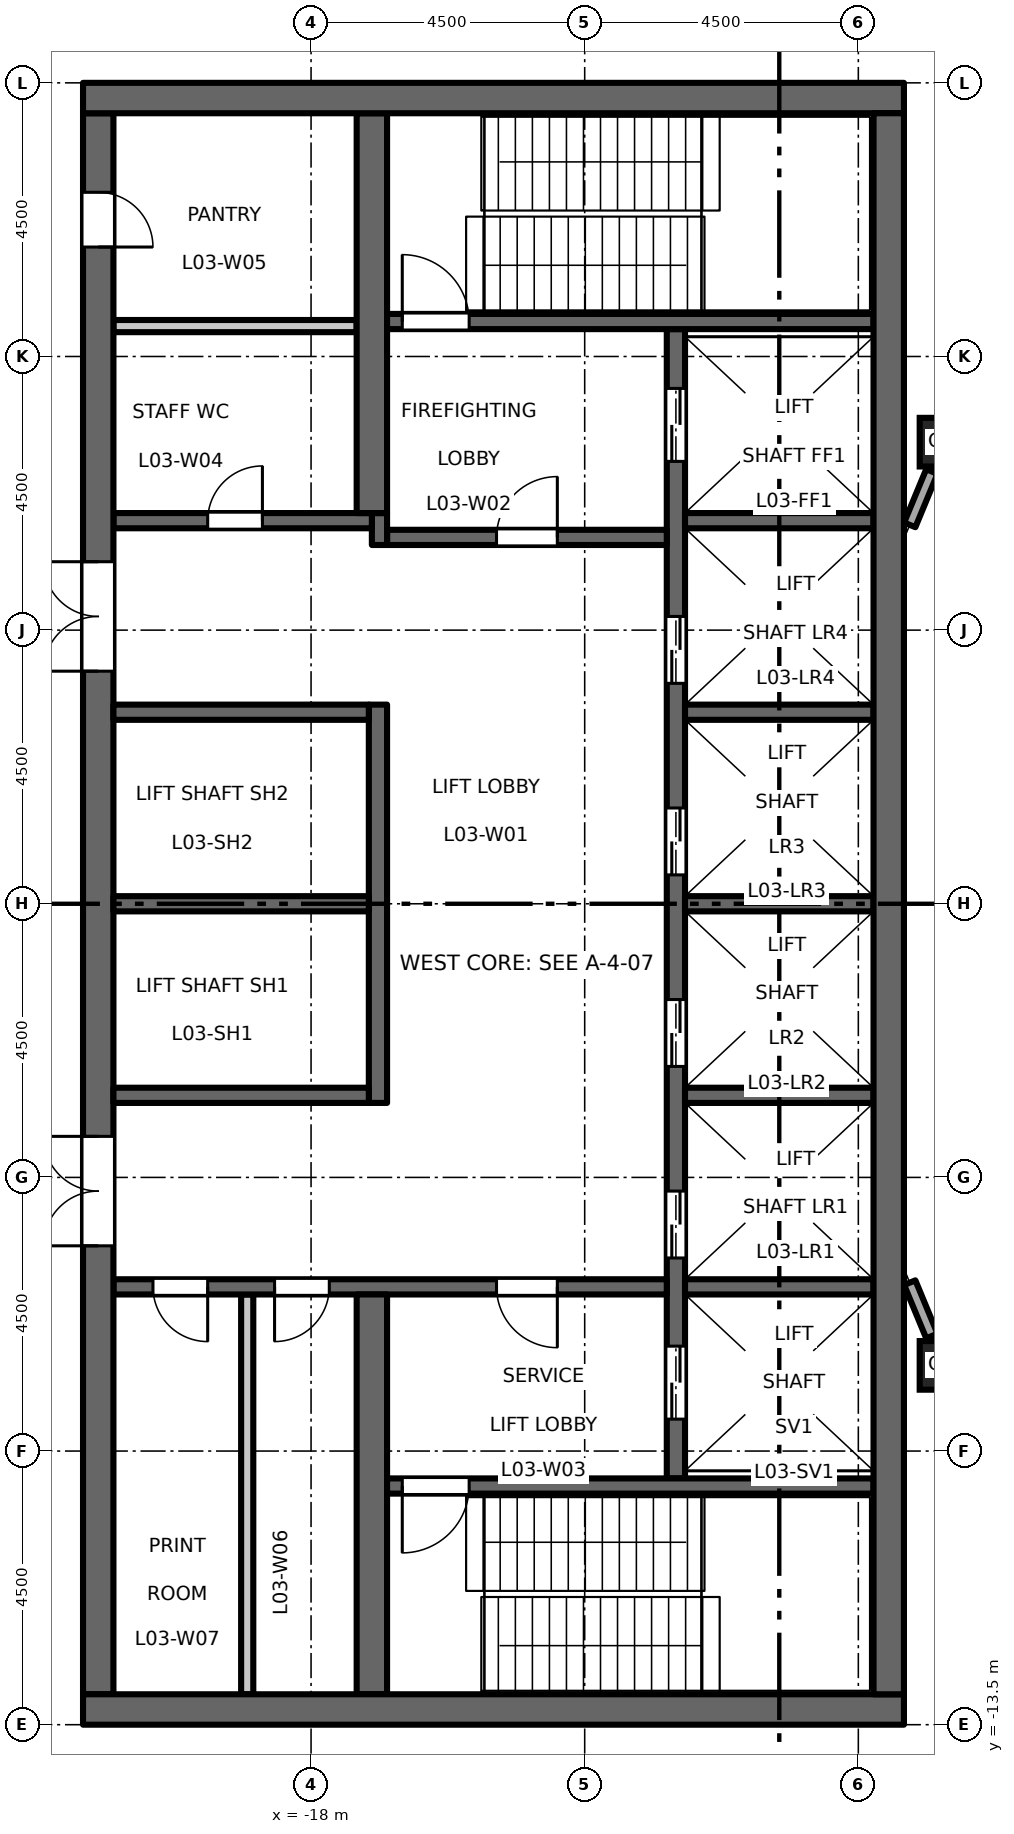
"""IFC4 building model, lengths in metres.
Left out: names, types, materials, properties, quantities, classifications, styles, units other than length and angle.
Written with IfcOpenShell. Run it as: python <this file> out.ifc"""

import sys

from ifc_helpers import new_model, si_unit, direction, frame, frame_2d, origin, origin_2d, place, context, subcontext, project, spatial, rectangle, hollow_rectangle, extrude, element, fill, save


model = new_model("IFC4")
c1 = context("Model", 3, precision=1e-05, world=origin(), true_north=direction((0.0, 1.0)))
c2 = subcontext(c1, "Body", "Model", "MODEL_VIEW")
j1 = project(units=[si_unit("LENGTHUNIT", "METRE"), si_unit("PLANEANGLEUNIT", "RADIAN")], contexts=[c1])
p1 = place(None, origin())
s1 = spatial("IfcSite", under=j1, at=p1, CompositionType="ELEMENT")
p2 = place(p1, origin())
s2 = spatial("IfcBuilding", under=s1, at=p2, CompositionType="ELEMENT")
p3 = place(p2, frame((0.0, 0.0, 17.2)))
s3 = spatial("IfcBuildingStorey", under=s2, at=p3, CompositionType="ELEMENT", Elevation=17.2)
for number, where, z_axis, x_axis in (
    (1, (-7.591, -7.591, 0.0), (0.0, 0.0, 1.0), (1.0, 0.0, 0.0)),
    (2, (-7.591, 7.591, 0.0), (0.0, 0.0, 1.0), (1.0, 0.0, 0.0)),
):
    element("IfcColumn", number, at=place(p3, frame(where, z_axis=z_axis, x_axis=x_axis)), inside=s3, PredefinedType="COLUMN", context=c2, shape_type="SweptSolid", body=[
        extrude(hollow_rectangle(XDim=0.8, YDim=0.8, WallThickness=0.05, at=origin_2d()), origin(), (0.0, 0.0, 1.0), 5.0),
    ])
p4 = place(p3, frame((-12.0, -9.45, 0.0), z_axis=(0.0, 0.0, 1.0), x_axis=(0.0, 1.0, 0.0)))
e3 = element("IfcWall", 3, at=p4, inside=s3, PredefinedType="SHEAR", context=c2, shape_type="SweptSolid", body=[
    extrude(rectangle(XDim=18.9, YDim=0.3, at=frame_2d((9.45, 0.0))), origin(), (0.0, 0.0, 1.0), 4.85),
])
p5 = place(p4, frame((3.625, 0.0, 0.0)))
e4 = element("IfcOpeningElement", 4, at=p5, cuts=e3, PredefinedType="OPENING", context=c2, shape_type="SweptSolid", body=[
    extrude(rectangle(XDim=1.1, YDim=2.1, at=frame_2d((0.55, 1.05))), frame((0.0, 0.16, 0.0), z_axis=(0.0, -1.0, 0.0), x_axis=(1.0, 0.0, 0.0)), (0.0, 0.0, 1.0), 0.32),
])
p6 = place(p4, frame((6.775, 0.0, 0.0)))
e5 = element("IfcOpeningElement", 5, at=p6, cuts=e3, PredefinedType="OPENING", context=c2, shape_type="SweptSolid", body=[
    extrude(rectangle(XDim=1.1, YDim=2.1, at=frame_2d((0.55, 1.05))), frame((0.0, 0.16, 0.0), z_axis=(0.0, -1.0, 0.0), x_axis=(1.0, 0.0, 0.0)), (0.0, 0.0, 1.0), 0.32),
])
p7 = place(p4, frame((9.925, 0.0, 0.0)))
e6 = element("IfcOpeningElement", 6, at=p7, cuts=e3, PredefinedType="OPENING", context=c2, shape_type="SweptSolid", body=[
    extrude(rectangle(XDim=1.1, YDim=2.1, at=frame_2d((0.55, 1.05))), frame((0.0, 0.16, 0.0), z_axis=(0.0, -1.0, 0.0), x_axis=(1.0, 0.0, 0.0)), (0.0, 0.0, 1.0), 0.32),
])
p8 = place(p4, frame((13.075, 0.0, 0.0)))
e7 = element("IfcOpeningElement", 7, at=p8, cuts=e3, PredefinedType="OPENING", context=c2, shape_type="SweptSolid", body=[
    extrude(rectangle(XDim=1.1, YDim=2.1, at=frame_2d((0.55, 1.05))), frame((0.0, 0.16, 0.0), z_axis=(0.0, -1.0, 0.0), x_axis=(1.0, 0.0, 0.0)), (0.0, 0.0, 1.0), 0.32),
])
p9 = place(p4, frame((16.725, 0.0, 0.0)))
e8 = element("IfcOpeningElement", 8, at=p9, cuts=e3, PredefinedType="OPENING", context=c2, shape_type="SweptSolid", body=[
    extrude(rectangle(XDim=1.2, YDim=2.1, at=frame_2d((0.6, 1.05))), frame((0.0, 0.16, 0.0), z_axis=(0.0, -1.0, 0.0), x_axis=(1.0, 0.0, 0.0)), (0.0, 0.0, 1.0), 0.32),
])
p10 = place(p4, frame((0.975, 0.0, 0.0)))
e9 = element("IfcOpeningElement", 9, at=p10, cuts=e3, PredefinedType="OPENING", context=c2, shape_type="SweptSolid", body=[
    extrude(rectangle(XDim=1.2, YDim=2.1, at=frame_2d((0.6, 1.05))), frame((0.0, 0.16, 0.0), z_axis=(0.0, -1.0, 0.0), x_axis=(1.0, 0.0, 0.0)), (0.0, 0.0, 1.0), 0.32),
])
p11 = place(p3, frame((-12.15, 6.025, 0.0), z_axis=(0.0, 0.0, 1.0), x_axis=(-1.0, 0.0, 0.0)))
e10 = element("IfcWall", 10, at=p11, inside=s3, PredefinedType="SHEAR", context=c2, shape_type="SweptSolid", body=[
    extrude(rectangle(XDim=4.6, YDim=0.25, at=frame_2d((2.3, 0.0))), origin(), (0.0, 0.0, 1.0), 4.85),
])
p12 = place(p11, frame((1.8, 0.0, 0.0)))
e11 = element("IfcOpeningElement", 11, at=p12, cuts=e10, PredefinedType="OPENING", context=c2, shape_type="SweptSolid", body=[
    extrude(rectangle(XDim=1.0, YDim=2.1, at=frame_2d((0.5, 1.05))), frame((0.0, 0.135, 0.0), z_axis=(0.0, -1.0, 0.0), x_axis=(1.0, 0.0, 0.0)), (0.0, 0.0, 1.0), 0.27),
])
p13 = place(p3, frame((-16.875, 5.9, 0.0), z_axis=(0.0, 0.0, 1.0), x_axis=(0.0, 1.0, 0.0)))
e12 = element("IfcWall", 12, at=p13, inside=s3, PredefinedType="SHEAR", context=c2, shape_type="SweptSolid", body=[
    extrude(rectangle(XDim=0.525, YDim=0.25, at=frame_2d((0.263, 0.0))), origin(), (0.0, 0.0, 1.0), 4.85),
])
p14 = place(p3, frame((-17.0, 6.3, 0.0), z_axis=(0.0, 0.0, 1.0), x_axis=(-1.0, 0.0, 0.0)))
e13 = element("IfcWall", 13, at=p14, inside=s3, PredefinedType="SHEAR", context=c2, shape_type="SweptSolid", body=[
    extrude(rectangle(XDim=4.25, YDim=0.25, at=frame_2d((2.125, 0.0))), origin(), (0.0, 0.0, 1.0), 4.85),
])
p15 = place(p14, frame((1.8, 0.0, 0.0)))
e14 = element("IfcOpeningElement", 14, at=p15, cuts=e13, PredefinedType="OPENING", context=c2, shape_type="SweptSolid", body=[
    extrude(rectangle(XDim=0.9, YDim=2.1, at=frame_2d((0.45, 1.05))), frame((0.0, 0.135, 0.0), z_axis=(0.0, -1.0, 0.0), x_axis=(1.0, 0.0, 0.0)), (0.0, 0.0, 1.0), 0.27),
])
p16 = place(p3, frame((-12.15, -6.3, 0.0), z_axis=(0.0, 0.0, 1.0), x_axis=(-1.0, 0.0, 0.0)))
e15 = element("IfcWall", 15, at=p16, inside=s3, PredefinedType="SHEAR", context=c2, shape_type="SweptSolid", body=[
    extrude(rectangle(XDim=9.1, YDim=0.25, at=frame_2d((4.55, 0.0))), origin(), (0.0, 0.0, 1.0), 4.85),
])
p17 = place(p16, frame((1.8, 0.0, 0.0)))
e16 = element("IfcOpeningElement", 16, at=p17, cuts=e15, PredefinedType="OPENING", context=c2, shape_type="SweptSolid", body=[
    extrude(rectangle(XDim=1.0, YDim=2.1, at=frame_2d((0.5, 1.05))), frame((0.0, 0.135, 0.0), z_axis=(0.0, -1.0, 0.0), x_axis=(1.0, 0.0, 0.0)), (0.0, 0.0, 1.0), 0.27),
])
p18 = place(p16, frame((5.55, 0.0, 0.0)))
e17 = element("IfcOpeningElement", 17, at=p18, cuts=e15, PredefinedType="OPENING", context=c2, shape_type="SweptSolid", body=[
    extrude(rectangle(XDim=0.9, YDim=2.1, at=frame_2d((0.45, 1.05))), frame((0.0, 0.135, 0.0), z_axis=(0.0, -1.0, 0.0), x_axis=(1.0, 0.0, 0.0)), (0.0, 0.0, 1.0), 0.27),
])
p19 = place(p16, frame((7.55, 0.0, 0.0)))
e18 = element("IfcOpeningElement", 18, at=p19, cuts=e15, PredefinedType="OPENING", context=c2, shape_type="SweptSolid", body=[
    extrude(rectangle(XDim=0.9, YDim=2.1, at=frame_2d((0.45, 1.05))), frame((0.0, 0.135, 0.0), z_axis=(0.0, -1.0, 0.0), x_axis=(1.0, 0.0, 0.0)), (0.0, 0.0, 1.0), 0.27),
])
p20 = place(p3, frame((-21.5, -13.0, 0.0), z_axis=(0.0, 0.0, 1.0), x_axis=(0.0, 1.0, 0.0)))
e19 = element("IfcWall", 19, at=p20, inside=s3, PredefinedType="SHEAR", context=c2, shape_type="SweptSolid", body=[
    extrude(rectangle(XDim=26.0, YDim=0.5, at=frame_2d((13.0, 0.0))), origin(), (0.0, 0.0, 1.0), 4.85),
])
p21 = place(p20, frame((16.825, 0.0, 0.0)))
e20 = element("IfcOpeningElement", 20, at=p21, cuts=e19, PredefinedType="OPENING", context=c2, shape_type="SweptSolid", body=[
    extrude(rectangle(XDim=1.8, YDim=2.1, at=frame_2d((0.9, 1.05))), frame((0.0, 0.26, 0.0), z_axis=(0.0, -1.0, 0.0), x_axis=(1.0, 0.0, 0.0)), (0.0, 0.0, 1.0), 0.52),
])
p22 = place(p20, frame((7.375, 0.0, 0.0)))
e21 = element("IfcOpeningElement", 21, at=p22, cuts=e19, PredefinedType="OPENING", context=c2, shape_type="SweptSolid", body=[
    extrude(rectangle(XDim=1.8, YDim=2.1, at=frame_2d((0.9, 1.05))), frame((0.0, 0.26, 0.0), z_axis=(0.0, -1.0, 0.0), x_axis=(1.0, 0.0, 0.0)), (0.0, 0.0, 1.0), 0.52),
])
p23 = place(p20, frame((23.8, 0.0, 0.0)))
e22 = element("IfcOpeningElement", 22, at=p23, cuts=e19, PredefinedType="OPENING", context=c2, shape_type="SweptSolid", body=[
    extrude(rectangle(XDim=0.9, YDim=2.1, at=frame_2d((0.45, 1.05))), frame((0.0, 0.26, 0.0), z_axis=(0.0, -1.0, 0.0), x_axis=(1.0, 0.0, 0.0)), (0.0, 0.0, 1.0), 0.52),
])
p24 = place(p3, frame((-17.25, 9.5, 0.0), z_axis=(0.0, 0.0, 1.0), x_axis=(-1.0, 0.0, 0.0)))
e23 = element("IfcWall", 23, at=p24, inside=s3, PredefinedType="PARTITIONING", context=c2, shape_type="SweptSolid", body=[
    extrude(rectangle(XDim=4.0, YDim=0.2, at=frame_2d((2.0, 0.0))), origin(), (0.0, 0.0, 1.0), 4.85),
])
p25 = place(p3, frame((-19.05, -13.0, 0.0), z_axis=(0.0, 0.0, 1.0), x_axis=(0.0, 1.0, 0.0)))
e24 = element("IfcWall", 24, at=p25, inside=s3, PredefinedType="PARTITIONING", context=c2, shape_type="SweptSolid", body=[
    extrude(rectangle(XDim=6.575, YDim=0.2, at=frame_2d((3.288, 0.0))), origin(), (0.0, 0.0, 1.0), 4.85),
])
p26 = place(p3, frame((-16.9, -3.275, 0.0), z_axis=(0.0, 0.0, 1.0), x_axis=(0.0, 1.0, 0.0)))
e25 = element("IfcWall", 25, at=p26, inside=s3, PredefinedType="SHEAR", context=c2, shape_type="SweptSolid", body=[
    extrude(rectangle(XDim=6.55, YDim=0.3, at=frame_2d((3.275, 0.0))), origin(), (0.0, 0.0, 1.0), 4.85),
])
for number, where, z_axis, x_axis in (
    (26, (-17.05, 0.0, 0.0), (0.0, 0.0, 1.0), (-1.0, 0.0, 0.0)),
    (27, (-17.05, 3.15, 0.0), (0.0, 0.0, 1.0), (-1.0, 0.0, 0.0)),
    (28, (-17.05, -3.15, 0.0), (0.0, 0.0, 1.0), (-1.0, 0.0, 0.0)),
):
    element("IfcWall", number, at=place(p3, frame(where, z_axis=z_axis, x_axis=x_axis)), inside=s3, PredefinedType="SHEAR", context=c2, shape_type="SweptSolid", body=[
        extrude(rectangle(XDim=4.2, YDim=0.25, at=frame_2d((2.1, 0.0))), origin(), (0.0, 0.0, 1.0), 4.85),
    ])
for number, where, z_axis, x_axis in (
    (29, (-17.0, 6.425, 0.0), (0.0, 0.0, 1.0), (0.0, 1.0, 0.0)),
    (30, (-17.0, -13.0, 0.0), (0.0, 0.0, 1.0), (0.0, 1.0, 0.0)),
):
    element("IfcWall", number, at=place(p3, frame(where, z_axis=z_axis, x_axis=x_axis)), inside=s3, PredefinedType="SHEAR", context=c2, shape_type="SweptSolid", body=[
        extrude(rectangle(XDim=6.575, YDim=0.5, at=frame_2d((3.288, 0.0))), origin(), (0.0, 0.0, 1.0), 4.85),
    ])
for number, where, z_axis, x_axis in (
    (31, (-8.75, 0.0, 0.0), (0.0, 0.0, 1.0), (-1.0, 0.0, 0.0)),
    (32, (-8.75, 3.15, 0.0), (0.0, 0.0, 1.0), (-1.0, 0.0, 0.0)),
    (33, (-8.75, 6.3, 0.0), (0.0, 0.0, 1.0), (-1.0, 0.0, 0.0)),
    (34, (-8.75, -3.15, 0.0), (0.0, 0.0, 1.0), (-1.0, 0.0, 0.0)),
    (35, (-8.75, -6.3, 0.0), (0.0, 0.0, 1.0), (-1.0, 0.0, 0.0)),
):
    element("IfcWall", number, at=place(p3, frame(where, z_axis=z_axis, x_axis=x_axis)), inside=s3, PredefinedType="SHEAR", context=c2, shape_type="SweptSolid", body=[
        extrude(rectangle(XDim=3.1, YDim=0.25, at=frame_2d((1.55, 0.0))), origin(), (0.0, 0.0, 1.0), 4.85),
    ])
p27 = place(p3, frame((-8.75, 9.575, 0.0), z_axis=(0.0, 0.0, 1.0), x_axis=(-1.0, 0.0, 0.0)))
e36 = element("IfcWall", 36, at=p27, inside=s3, PredefinedType="SHEAR", context=c2, shape_type="SweptSolid", body=[
    extrude(rectangle(XDim=8.0, YDim=0.25, at=frame_2d((4.0, 0.0))), origin(), (0.0, 0.0, 1.0), 4.85),
])
p28 = place(p27, frame((6.65, 0.0, 0.0)))
e37 = element("IfcOpeningElement", 37, at=p28, cuts=e36, PredefinedType="OPENING", context=c2, shape_type="SweptSolid", body=[
    extrude(rectangle(XDim=1.1, YDim=2.1, at=frame_2d((0.55, 1.05))), frame((0.0, 0.135, 0.0), z_axis=(0.0, -1.0, 0.0), x_axis=(1.0, 0.0, 0.0)), (0.0, 0.0, 1.0), 0.27),
])
p29 = place(p3, frame((-8.75, -9.575, 0.0), z_axis=(0.0, 0.0, 1.0), x_axis=(-1.0, 0.0, 0.0)))
e38 = element("IfcWall", 38, at=p29, inside=s3, PredefinedType="SHEAR", context=c2, shape_type="SweptSolid", body=[
    extrude(rectangle(XDim=8.0, YDim=0.25, at=frame_2d((4.0, 0.0))), origin(), (0.0, 0.0, 1.0), 4.85),
])
p30 = place(p29, frame((6.65, 0.0, 0.0)))
e39 = element("IfcOpeningElement", 39, at=p30, cuts=e38, PredefinedType="OPENING", context=c2, shape_type="SweptSolid", body=[
    extrude(rectangle(XDim=1.1, YDim=2.1, at=frame_2d((0.55, 1.05))), frame((0.0, 0.135, 0.0), z_axis=(0.0, -1.0, 0.0), x_axis=(1.0, 0.0, 0.0)), (0.0, 0.0, 1.0), 0.27),
])
for number, where, z_axis, x_axis in (
    (40, (-8.25, 13.25, 0.0), (0.0, 0.0, 1.0), (-1.0, 0.0, 0.0)),
    (41, (-8.25, -13.25, 0.0), (0.0, 0.0, 1.0), (-1.0, 0.0, 0.0)),
):
    element("IfcWall", number, at=place(p3, frame(where, z_axis=z_axis, x_axis=x_axis)), inside=s3, PredefinedType="SHEAR", context=c2, shape_type="SweptSolid", body=[
        extrude(rectangle(XDim=13.5, YDim=0.5, at=frame_2d((6.75, 0.0))), origin(), (0.0, 0.0, 1.0), 4.85),
    ])
p31 = place(p3, frame((-8.5, -13.0, 0.0), z_axis=(0.0, 0.0, 1.0), x_axis=(0.0, 1.0, 0.0)))
e42 = element("IfcWall", 42, at=p31, inside=s3, PredefinedType="SHEAR", context=c2, shape_type="SweptSolid", body=[
    extrude(rectangle(XDim=26.0, YDim=0.5, at=frame_2d((13.0, 0.0))), origin(), (0.0, 0.0, 1.0), 4.85),
])
for number, where, z_axis, x_axis in (
    (43, (-7.791, 7.108, 0.0), (0.0, 0.0, 1.0), (-0.383, -0.924, 0.0)),
    (44, (-8.154, -6.231, 0.0), (0.0, 0.0, 1.0), (0.383, -0.924, 0.0)),
):
    element("IfcWall", number, at=place(p3, frame(where, z_axis=z_axis, x_axis=x_axis)), inside=s3, PredefinedType="STANDARD", context=c2, shape_type="SweptSolid", body=[
        extrude(rectangle(XDim=0.949, YDim=0.2, at=frame_2d((0.475, 0.0))), origin(), (0.0, 0.0, 1.0), 4.23),
    ])
p32 = place(p12, origin())
e45 = element("IfcDoor", 45, at=p32, inside=s3, OperationType="SINGLE_SWING_LEFT", PredefinedType="DOOR", context=c2, shape_type="SweptSolid", body=[
    extrude(rectangle(XDim=1.0, YDim=2.1, at=frame_2d((0.5, 1.05))), frame((0.0, 0.025, 0.0), z_axis=(0.0, -1.0, 0.0), x_axis=(1.0, 0.0, 0.0)), (0.0, 0.0, 1.0), 0.05),
])
fill(e11, e45)
p33 = place(p17, origin())
e46 = element("IfcDoor", 46, at=p33, inside=s3, OperationType="SINGLE_SWING_RIGHT", PredefinedType="DOOR", context=c2, shape_type="SweptSolid", body=[
    extrude(rectangle(XDim=1.0, YDim=2.1, at=frame_2d((0.5, 1.05))), frame((0.0, 0.025, 0.0), z_axis=(0.0, -1.0, 0.0), x_axis=(1.0, 0.0, 0.0)), (0.0, 0.0, 1.0), 0.05),
])
fill(e16, e46)
p34 = place(p28, origin())
e47 = element("IfcDoor", 47, at=p34, inside=s3, OperationType="SINGLE_SWING_RIGHT", PredefinedType="DOOR", context=c2, shape_type="SweptSolid", body=[
    extrude(rectangle(XDim=1.1, YDim=2.1, at=frame_2d((0.55, 1.05))), frame((0.0, 0.025, 0.0), z_axis=(0.0, -1.0, 0.0), x_axis=(1.0, 0.0, 0.0)), (0.0, 0.0, 1.0), 0.05),
])
fill(e37, e47)
p35 = place(p30, origin())
e48 = element("IfcDoor", 48, at=p35, inside=s3, OperationType="SINGLE_SWING_LEFT", PredefinedType="DOOR", context=c2, shape_type="SweptSolid", body=[
    extrude(rectangle(XDim=1.1, YDim=2.1, at=frame_2d((0.55, 1.05))), frame((0.0, 0.025, 0.0), z_axis=(0.0, -1.0, 0.0), x_axis=(1.0, 0.0, 0.0)), (0.0, 0.0, 1.0), 0.05),
])
fill(e39, e48)
p36 = place(p21, origin())
e49 = element("IfcDoor", 49, at=p36, inside=s3, OperationType="DOUBLE_DOOR_DOUBLE_SWING", PredefinedType="DOOR", context=c2, shape_type="SweptSolid", body=[
    extrude(rectangle(XDim=1.8, YDim=2.1, at=frame_2d((0.9, 1.05))), frame((0.0, 0.025, 0.0), z_axis=(0.0, -1.0, 0.0), x_axis=(1.0, 0.0, 0.0)), (0.0, 0.0, 1.0), 0.05),
])
fill(e20, e49)
p37 = place(p22, origin())
e50 = element("IfcDoor", 50, at=p37, inside=s3, OperationType="DOUBLE_DOOR_DOUBLE_SWING", PredefinedType="DOOR", context=c2, shape_type="SweptSolid", body=[
    extrude(rectangle(XDim=1.8, YDim=2.1, at=frame_2d((0.9, 1.05))), frame((0.0, 0.025, 0.0), z_axis=(0.0, -1.0, 0.0), x_axis=(1.0, 0.0, 0.0)), (0.0, 0.0, 1.0), 0.05),
])
fill(e21, e50)
p38 = place(p5, origin())
e51 = element("IfcDoor", 51, at=p38, inside=s3, OperationType="DOUBLE_DOOR_SLIDING", PredefinedType="DOOR", context=c2, shape_type="SweptSolid", body=[
    extrude(rectangle(XDim=1.1, YDim=2.1, at=frame_2d((0.55, 1.05))), frame((0.0, 0.025, 0.0), z_axis=(0.0, -1.0, 0.0), x_axis=(1.0, 0.0, 0.0)), (0.0, 0.0, 1.0), 0.05),
])
fill(e4, e51)
p39 = place(p6, origin())
e52 = element("IfcDoor", 52, at=p39, inside=s3, OperationType="DOUBLE_DOOR_SLIDING", PredefinedType="DOOR", context=c2, shape_type="SweptSolid", body=[
    extrude(rectangle(XDim=1.1, YDim=2.1, at=frame_2d((0.55, 1.05))), frame((0.0, 0.025, 0.0), z_axis=(0.0, -1.0, 0.0), x_axis=(1.0, 0.0, 0.0)), (0.0, 0.0, 1.0), 0.05),
])
fill(e5, e52)
p40 = place(p7, origin())
e53 = element("IfcDoor", 53, at=p40, inside=s3, OperationType="DOUBLE_DOOR_SLIDING", PredefinedType="DOOR", context=c2, shape_type="SweptSolid", body=[
    extrude(rectangle(XDim=1.1, YDim=2.1, at=frame_2d((0.55, 1.05))), frame((0.0, 0.025, 0.0), z_axis=(0.0, -1.0, 0.0), x_axis=(1.0, 0.0, 0.0)), (0.0, 0.0, 1.0), 0.05),
])
fill(e6, e53)
p41 = place(p8, origin())
e54 = element("IfcDoor", 54, at=p41, inside=s3, OperationType="DOUBLE_DOOR_SLIDING", PredefinedType="DOOR", context=c2, shape_type="SweptSolid", body=[
    extrude(rectangle(XDim=1.1, YDim=2.1, at=frame_2d((0.55, 1.05))), frame((0.0, 0.025, 0.0), z_axis=(0.0, -1.0, 0.0), x_axis=(1.0, 0.0, 0.0)), (0.0, 0.0, 1.0), 0.05),
])
fill(e7, e54)
p42 = place(p9, origin())
e55 = element("IfcDoor", 55, at=p42, inside=s3, OperationType="DOUBLE_DOOR_SLIDING", PredefinedType="DOOR", context=c2, shape_type="SweptSolid", body=[
    extrude(rectangle(XDim=1.2, YDim=2.1, at=frame_2d((0.6, 1.05))), frame((0.0, 0.025, 0.0), z_axis=(0.0, -1.0, 0.0), x_axis=(1.0, 0.0, 0.0)), (0.0, 0.0, 1.0), 0.05),
])
fill(e8, e55)
p43 = place(p10, origin())
e56 = element("IfcDoor", 56, at=p43, inside=s3, OperationType="DOUBLE_DOOR_SLIDING", PredefinedType="DOOR", context=c2, shape_type="SweptSolid", body=[
    extrude(rectangle(XDim=1.2, YDim=2.1, at=frame_2d((0.6, 1.05))), frame((0.0, 0.025, 0.0), z_axis=(0.0, -1.0, 0.0), x_axis=(1.0, 0.0, 0.0)), (0.0, 0.0, 1.0), 0.05),
])
fill(e9, e56)
p44 = place(p15, origin())
e57 = element("IfcDoor", 57, at=p44, inside=s3, OperationType="SINGLE_SWING_LEFT", PredefinedType="DOOR", context=c2, shape_type="SweptSolid", body=[
    extrude(rectangle(XDim=0.9, YDim=2.1, at=frame_2d((0.45, 1.05))), frame((0.0, 0.025, 0.0), z_axis=(0.0, -1.0, 0.0), x_axis=(1.0, 0.0, 0.0)), (0.0, 0.0, 1.0), 0.05),
])
fill(e14, e57)
p45 = place(p23, origin())
e58 = element("IfcDoor", 58, at=p45, inside=s3, OperationType="SINGLE_SWING_LEFT", PredefinedType="DOOR", context=c2, shape_type="SweptSolid", body=[
    extrude(rectangle(XDim=0.9, YDim=2.1, at=frame_2d((0.45, 1.05))), frame((0.0, 0.025, 0.0), z_axis=(0.0, -1.0, 0.0), x_axis=(1.0, 0.0, 0.0)), (0.0, 0.0, 1.0), 0.05),
])
fill(e22, e58)
p46 = place(p18, origin())
e59 = element("IfcDoor", 59, at=p46, inside=s3, OperationType="SINGLE_SWING_LEFT", PredefinedType="DOOR", context=c2, shape_type="SweptSolid", body=[
    extrude(rectangle(XDim=0.9, YDim=2.1, at=frame_2d((0.45, 1.05))), frame((0.0, 0.025, 0.0), z_axis=(0.0, -1.0, 0.0), x_axis=(1.0, 0.0, 0.0)), (0.0, 0.0, 1.0), 0.05),
])
fill(e17, e59)
p47 = place(p19, origin())
e60 = element("IfcDoor", 60, at=p47, inside=s3, OperationType="SINGLE_SWING_RIGHT", PredefinedType="DOOR", context=c2, shape_type="SweptSolid", body=[
    extrude(rectangle(XDim=0.9, YDim=2.1, at=frame_2d((0.45, 1.05))), frame((0.0, 0.025, 0.0), z_axis=(0.0, -1.0, 0.0), x_axis=(1.0, 0.0, 0.0)), (0.0, 0.0, 1.0), 0.05),
])
fill(e18, e60)
save(model, sys.argv[1])
